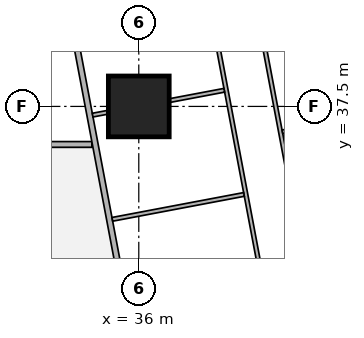
"""IFC4 building model, lengths in metres.
Left out: names, types, materials, properties, quantities, classifications, styles, units other than length and angle.
Written with IfcOpenShell. Run it as: python <this file> out.ifc"""

import sys

from ifc_helpers import new_model, si_unit, direction, frame, frame_2d, origin, origin_2d, place, context, subcontext, project, spatial, rectangle, extrude, element, fill, save


model = new_model("IFC4")
c1 = context("Model", 3, precision=1e-05, world=origin(), true_north=direction((0.0, 1.0)))
c2 = subcontext(c1, "Body", "Model", "MODEL_VIEW")
j1 = project(units=[si_unit("LENGTHUNIT", "METRE"), si_unit("PLANEANGLEUNIT", "RADIAN")], contexts=[c1])
p1 = place(None, origin())
s1 = spatial("IfcSite", under=j1, at=p1, CompositionType="ELEMENT")
p2 = place(p1, origin())
s2 = spatial("IfcBuilding", under=s1, at=p2, CompositionType="ELEMENT")
p3 = place(p2, frame((0.0, 0.0, 111.65)))
s3 = spatial("IfcBuildingStorey", under=s2, at=p3, CompositionType="ELEMENT", Elevation=111.65)
p4 = place(p3, frame((36.0, 37.5, 0.0), z_axis=(0.0, 0.0, 1.0), x_axis=(1.0, 0.0, 0.0)))
e1 = element("IfcColumn", 1, at=p4, inside=s3, PredefinedType="COLUMN", context=c2, shape_type="SweptSolid", body=[
    extrude(rectangle(XDim=1.6, YDim=1.6, at=origin_2d()), origin(), (0.0, 0.0, 1.0), 3.75),
])
p5 = place(p3, frame((8.35, 36.5, 0.0), z_axis=(0.0, 0.0, 1.0), x_axis=(1.0, 0.0, 0.0)))
e2 = element("IfcWall", 2, at=p5, inside=s3, PredefinedType="SOLIDWALL", context=c2, shape_type="SweptSolid", body=[
    extrude(rectangle(XDim=26.415, YDim=0.15, at=frame_2d((13.208, 0.0))), origin(), (0.0, 0.0, 1.0), 3.5),
])
p6 = place(p5, frame((2.6, 0.0, 0.0)))
e3 = element("IfcOpeningElement", 3, at=p6, cuts=e2, PredefinedType="OPENING", context=c2, shape_type="SweptSolid", body=[
    extrude(rectangle(XDim=1.0, YDim=2.1, at=frame_2d((0.5, 1.05))), frame((0.0, 0.085, 0.0), z_axis=(0.0, -1.0, 0.0), x_axis=(1.0, 0.0, 0.0)), (0.0, 0.0, 1.0), 0.17),
])
p7 = place(p5, frame((10.949, 0.0, 0.0)))
e4 = element("IfcOpeningElement", 4, at=p7, cuts=e2, PredefinedType="OPENING", context=c2, shape_type="SweptSolid", body=[
    extrude(rectangle(XDim=1.0, YDim=2.1, at=frame_2d((0.5, 1.05))), frame((0.0, 0.085, 0.0), z_axis=(0.0, -1.0, 0.0), x_axis=(1.0, 0.0, 0.0)), (0.0, 0.0, 1.0), 0.17),
])
p8 = place(p5, frame((23.923, 0.0, 0.0)))
e5 = element("IfcOpeningElement", 5, at=p8, cuts=e2, PredefinedType="OPENING", context=c2, shape_type="SweptSolid", body=[
    extrude(rectangle(XDim=1.0, YDim=2.1, at=frame_2d((0.5, 1.05))), frame((0.0, 0.085, 0.0), z_axis=(0.0, -1.0, 0.0), x_axis=(1.0, 0.0, 0.0)), (0.0, 0.0, 1.0), 0.17),
])
p9 = place(p3, frame((33.127, 45.65, 0.0), z_axis=(0.0, 0.0, 1.0), x_axis=(0.185598547723, -0.98262565562, 0.0)))
e6 = element("IfcWall", 6, at=p9, inside=s3, PredefinedType="SOLIDWALL", context=c2, shape_type="SweptSolid", body=[
    extrude(rectangle(XDim=47.118, YDim=0.15, at=frame_2d((23.559, 0.0))), origin(), (0.0, 0.0, 1.0), 2.2),
])
p10 = place(p9, frame((20.373, 0.0, 0.0)))
e7 = element("IfcOpeningElement", 7, at=p10, cuts=e6, PredefinedType="OPENING", context=c2, shape_type="SweptSolid", body=[
    extrude(rectangle(XDim=1.0, YDim=2.1, at=frame_2d((0.5, 1.05))), frame((0.0, 0.085, 0.0), z_axis=(0.0, -1.0, 0.0), x_axis=(1.0, 0.0, 0.0)), (0.0, 0.0, 1.0), 0.17),
])
p11 = place(p9, frame((24.188, 0.0, 0.0)))
e8 = element("IfcOpeningElement", 8, at=p11, cuts=e6, PredefinedType="OPENING", context=c2, shape_type="SweptSolid", body=[
    extrude(rectangle(XDim=1.0, YDim=2.1, at=frame_2d((0.5, 1.05))), frame((0.0, 0.085, 0.0), z_axis=(0.0, -1.0, 0.0), x_axis=(1.0, 0.0, 0.0)), (0.0, 0.0, 1.0), 0.17),
])
p12 = place(p9, frame((32.608, 0.0, 0.0)))
e9 = element("IfcOpeningElement", 9, at=p12, cuts=e6, PredefinedType="OPENING", context=c2, shape_type="SweptSolid", body=[
    extrude(rectangle(XDim=1.0, YDim=2.1, at=frame_2d((0.5, 1.05))), frame((0.0, 0.085, 0.0), z_axis=(0.0, -1.0, 0.0), x_axis=(1.0, 0.0, 0.0)), (0.0, 0.0, 1.0), 0.17),
])
p13 = place(p3, frame((38.862, 41.42, 0.0), z_axis=(0.0, 0.0, 1.0), x_axis=(0.185550092293, -0.982634806655, 0.0)))
e10 = element("IfcWall", 10, at=p13, inside=s3, PredefinedType="PARTITIONING", context=c2, shape_type="SweptSolid", body=[
    extrude(rectangle(XDim=12.384, YDim=0.1, at=frame_2d((6.192, 0.0))), origin(), (0.0, 0.0, 1.0), 2.5),
])
p14 = place(p13, frame((11.212, 0.0, 0.0)))
e11 = element("IfcOpeningElement", 11, at=p14, cuts=e10, PredefinedType="OPENING", context=c2, shape_type="SweptSolid", body=[
    extrude(rectangle(XDim=0.9, YDim=2.1, at=frame_2d((0.45, 1.05))), frame((0.0, 0.06, 0.0), z_axis=(0.0, -1.0, 0.0), x_axis=(1.0, 0.0, 0.0)), (0.0, 0.0, 1.0), 0.12),
])
p15 = place(p13, frame((7.555, 0.0, 0.0)))
e12 = element("IfcOpeningElement", 12, at=p15, cuts=e10, PredefinedType="OPENING", context=c2, shape_type="SweptSolid", body=[
    extrude(rectangle(XDim=0.9, YDim=2.1, at=frame_2d((0.45, 1.05))), frame((0.0, 0.06, 0.0), z_axis=(0.0, -1.0, 0.0), x_axis=(1.0, 0.0, 0.0)), (0.0, 0.0, 1.0), 0.12),
])
p16 = place(p13, frame((3.579, 0.0, 0.0)))
e13 = element("IfcOpeningElement", 13, at=p16, cuts=e10, PredefinedType="OPENING", context=c2, shape_type="SweptSolid", body=[
    extrude(rectangle(XDim=0.9, YDim=2.1, at=frame_2d((0.45, 1.05))), frame((0.0, 0.06, 0.0), z_axis=(0.0, -1.0, 0.0), x_axis=(1.0, 0.0, 0.0)), (0.0, 0.0, 1.0), 0.12),
])
p17 = place(p3, frame((37.473, 42.309, 0.0), z_axis=(0.0, 0.0, 1.0), x_axis=(0.185583982986, -0.982628406499, 0.0)))
e14 = element("IfcWall", 14, at=p17, inside=s3, PredefinedType="PARTITIONING", context=c2, shape_type="SweptSolid", body=[
    extrude(rectangle(XDim=14.825, YDim=0.1, at=frame_2d((7.412, 0.0))), origin(), (0.0, 0.0, 1.0), 2.5),
])
p18 = place(p17, frame((13.4, 0.0, 0.0)))
e15 = element("IfcOpeningElement", 15, at=p18, cuts=e14, PredefinedType="OPENING", context=c2, shape_type="SweptSolid", body=[
    extrude(rectangle(XDim=0.9, YDim=2.1, at=frame_2d((0.45, 1.05))), frame((0.0, 0.06, 0.0), z_axis=(0.0, -1.0, 0.0), x_axis=(1.0, 0.0, 0.0)), (0.0, 0.0, 1.0), 0.12),
])
p19 = place(p17, frame((9.808, 0.0, 0.0)))
e16 = element("IfcOpeningElement", 16, at=p19, cuts=e14, PredefinedType="OPENING", context=c2, shape_type="SweptSolid", body=[
    extrude(rectangle(XDim=0.9, YDim=2.1, at=frame_2d((0.45, 1.05))), frame((0.0, 0.06, 0.0), z_axis=(0.0, -1.0, 0.0), x_axis=(1.0, 0.0, 0.0)), (0.0, 0.0, 1.0), 0.12),
])
p20 = place(p17, frame((5.397, 0.0, 0.0)))
e17 = element("IfcOpeningElement", 17, at=p20, cuts=e14, PredefinedType="OPENING", context=c2, shape_type="SweptSolid", body=[
    extrude(rectangle(XDim=0.9, YDim=2.1, at=frame_2d((0.45, 1.05))), frame((0.0, 0.06, 0.0), z_axis=(0.0, -1.0, 0.0), x_axis=(1.0, 0.0, 0.0)), (0.0, 0.0, 1.0), 0.12),
])
p21 = place(p17, frame((2.853, 0.0, 0.0)))
e18 = element("IfcOpeningElement", 18, at=p21, cuts=e14, PredefinedType="OPENING", context=c2, shape_type="SweptSolid", body=[
    extrude(rectangle(XDim=0.9, YDim=2.1, at=frame_2d((0.45, 1.05))), frame((0.0, 0.06, 0.0), z_axis=(0.0, -1.0, 0.0), x_axis=(1.0, 0.0, 0.0)), (0.0, 0.0, 1.0), 0.12),
])
p22 = place(p17, frame((11.491, 0.0, 0.0)))
e19 = element("IfcOpeningElement", 19, at=p22, cuts=e14, PredefinedType="OPENING", context=c2, shape_type="SweptSolid", body=[
    extrude(rectangle(XDim=0.9, YDim=2.1, at=frame_2d((0.45, 1.05))), frame((0.0, 0.06, 0.0), z_axis=(0.0, -1.0, 0.0), x_axis=(1.0, 0.0, 0.0)), (0.0, 0.0, 1.0), 0.12),
])
p23 = place(p17, frame((7.9, 0.0, 0.0)))
e20 = element("IfcOpeningElement", 20, at=p23, cuts=e14, PredefinedType="OPENING", context=c2, shape_type="SweptSolid", body=[
    extrude(rectangle(XDim=0.9, YDim=2.1, at=frame_2d((0.45, 1.05))), frame((0.0, 0.06, 0.0), z_axis=(0.0, -1.0, 0.0), x_axis=(1.0, 0.0, 0.0)), (0.0, 0.0, 1.0), 0.12),
])
p24 = place(p3, frame((40.954, 37.053, 0.0), z_axis=(0.0, 0.0, 1.0), x_axis=(-0.982600492424, -0.185731721275, 0.0)))
e21 = element("IfcWall", 21, at=p24, inside=s3, PredefinedType="PARTITIONING", context=c2, shape_type="SweptSolid", body=[
    extrude(rectangle(XDim=1.195, YDim=0.1, at=frame_2d((0.597, 0.0))), origin(), (0.0, 0.0, 1.0), 2.05),
])
p25 = place(p3, frame((38.25, 37.925, 0.0), z_axis=(0.0, 0.0, 1.0), x_axis=(-0.982626127294, -0.185596050493, 0.0)))
e22 = element("IfcWall", 22, at=p25, inside=s3, PredefinedType="PARTITIONING", context=c2, shape_type="SweptSolid", body=[
    extrude(rectangle(XDim=1.465, YDim=0.1, at=frame_2d((0.733, 0.0))), origin(), (0.0, 0.0, 1.0), 3.5),
])
p26 = place(p3, frame((35.19, 37.347, 0.0), z_axis=(0.0, 0.0, 1.0), x_axis=(-0.982798158448, -0.184682916784, 0.0)))
e23 = element("IfcWall", 23, at=p26, inside=s3, PredefinedType="PARTITIONING", context=c2, shape_type="SweptSolid", body=[
    extrude(rectangle(XDim=0.411, YDim=0.1, at=frame_2d((0.206, 0.0))), origin(), (0.0, 0.0, 1.0), 3.5),
])
p27 = place(p3, frame((38.768, 35.184, 0.0), z_axis=(0.0, 0.0, 1.0), x_axis=(-0.982588017646, -0.185797706064, 0.0)))
e24 = element("IfcWall", 24, at=p27, inside=s3, PredefinedType="PARTITIONING", context=c2, shape_type="SweptSolid", body=[
    extrude(rectangle(XDim=3.525, YDim=0.1, at=frame_2d((1.763, 0.0))), origin(), (0.0, 0.0, 1.0), 3.5),
])
p28 = place(p3, frame((34.193, 30.04, 0.0), z_axis=(0.0, 0.0, 1.0), x_axis=(-0.185626015863, 0.982620467034, 0.0)))
e25 = element("IfcWall", 25, at=p28, inside=s3, PredefinedType="PARTITIONING", context=c2, shape_type="SweptSolid", body=[
    extrude(rectangle(XDim=4.628, YDim=0.125, at=frame_2d((2.314, 0.0))), origin(), (0.0, 0.0, 1.0), 2.5),
])
p29 = place(p28, frame((1.05, 0.0, 0.0)))
e26 = element("IfcOpeningElement", 26, at=p29, cuts=e25, PredefinedType="OPENING", context=c2, shape_type="SweptSolid", body=[
    extrude(rectangle(XDim=1.0, YDim=2.1, at=frame_2d((0.5, 1.05))), frame((0.0, 0.073, 0.0), z_axis=(0.0, -1.0, 0.0), x_axis=(1.0, 0.0, 0.0)), (0.0, 0.0, 1.0), 0.145),
])
p30 = place(p28, frame((3.225, 0.0, 0.0)))
e27 = element("IfcOpeningElement", 27, at=p30, cuts=e25, PredefinedType="OPENING", context=c2, shape_type="SweptSolid", body=[
    extrude(rectangle(XDim=1.0, YDim=2.1, at=frame_2d((0.5, 1.05))), frame((0.0, 0.073, 0.0), z_axis=(0.0, -1.0, 0.0), x_axis=(1.0, 0.0, 0.0)), (0.0, 0.0, 1.0), 0.145),
])
p31 = place(p16, origin())
e28 = element("IfcDoor", 28, at=p31, inside=s3, OperationType="SINGLE_SWING_RIGHT", PredefinedType="DOOR", context=c2, shape_type="SweptSolid", body=[
    extrude(rectangle(XDim=0.9, YDim=2.1, at=frame_2d((0.45, 1.05))), frame((0.0, 0.025, 0.0), z_axis=(0.0, -1.0, 0.0), x_axis=(1.0, 0.0, 0.0)), (0.0, 0.0, 1.0), 0.05),
])
fill(e13, e28)
p32 = place(p20, origin())
e29 = element("IfcDoor", 29, at=p32, inside=s3, OperationType="SINGLE_SWING_LEFT", PredefinedType="DOOR", context=c2, shape_type="SweptSolid", body=[
    extrude(rectangle(XDim=0.9, YDim=2.1, at=frame_2d((0.45, 1.05))), frame((0.0, 0.025, 0.0), z_axis=(0.0, -1.0, 0.0), x_axis=(1.0, 0.0, 0.0)), (0.0, 0.0, 1.0), 0.05),
])
fill(e17, e29)
p33 = place(p21, origin())
e30 = element("IfcDoor", 30, at=p33, inside=s3, OperationType="SINGLE_SWING_RIGHT", PredefinedType="DOOR", context=c2, shape_type="SweptSolid", body=[
    extrude(rectangle(XDim=0.9, YDim=2.1, at=frame_2d((0.45, 1.05))), frame((0.0, 0.025, 0.0), z_axis=(0.0, -1.0, 0.0), x_axis=(1.0, 0.0, 0.0)), (0.0, 0.0, 1.0), 0.05),
])
fill(e18, e30)
p34 = place(p23, origin())
e31 = element("IfcDoor", 31, at=p34, inside=s3, OperationType="SINGLE_SWING_RIGHT", PredefinedType="DOOR", context=c2, shape_type="SweptSolid", body=[
    extrude(rectangle(XDim=0.9, YDim=2.1, at=frame_2d((0.45, 1.05))), frame((0.0, 0.025, 0.0), z_axis=(0.0, -1.0, 0.0), x_axis=(1.0, 0.0, 0.0)), (0.0, 0.0, 1.0), 0.05),
])
fill(e20, e31)
save(model, sys.argv[1])
